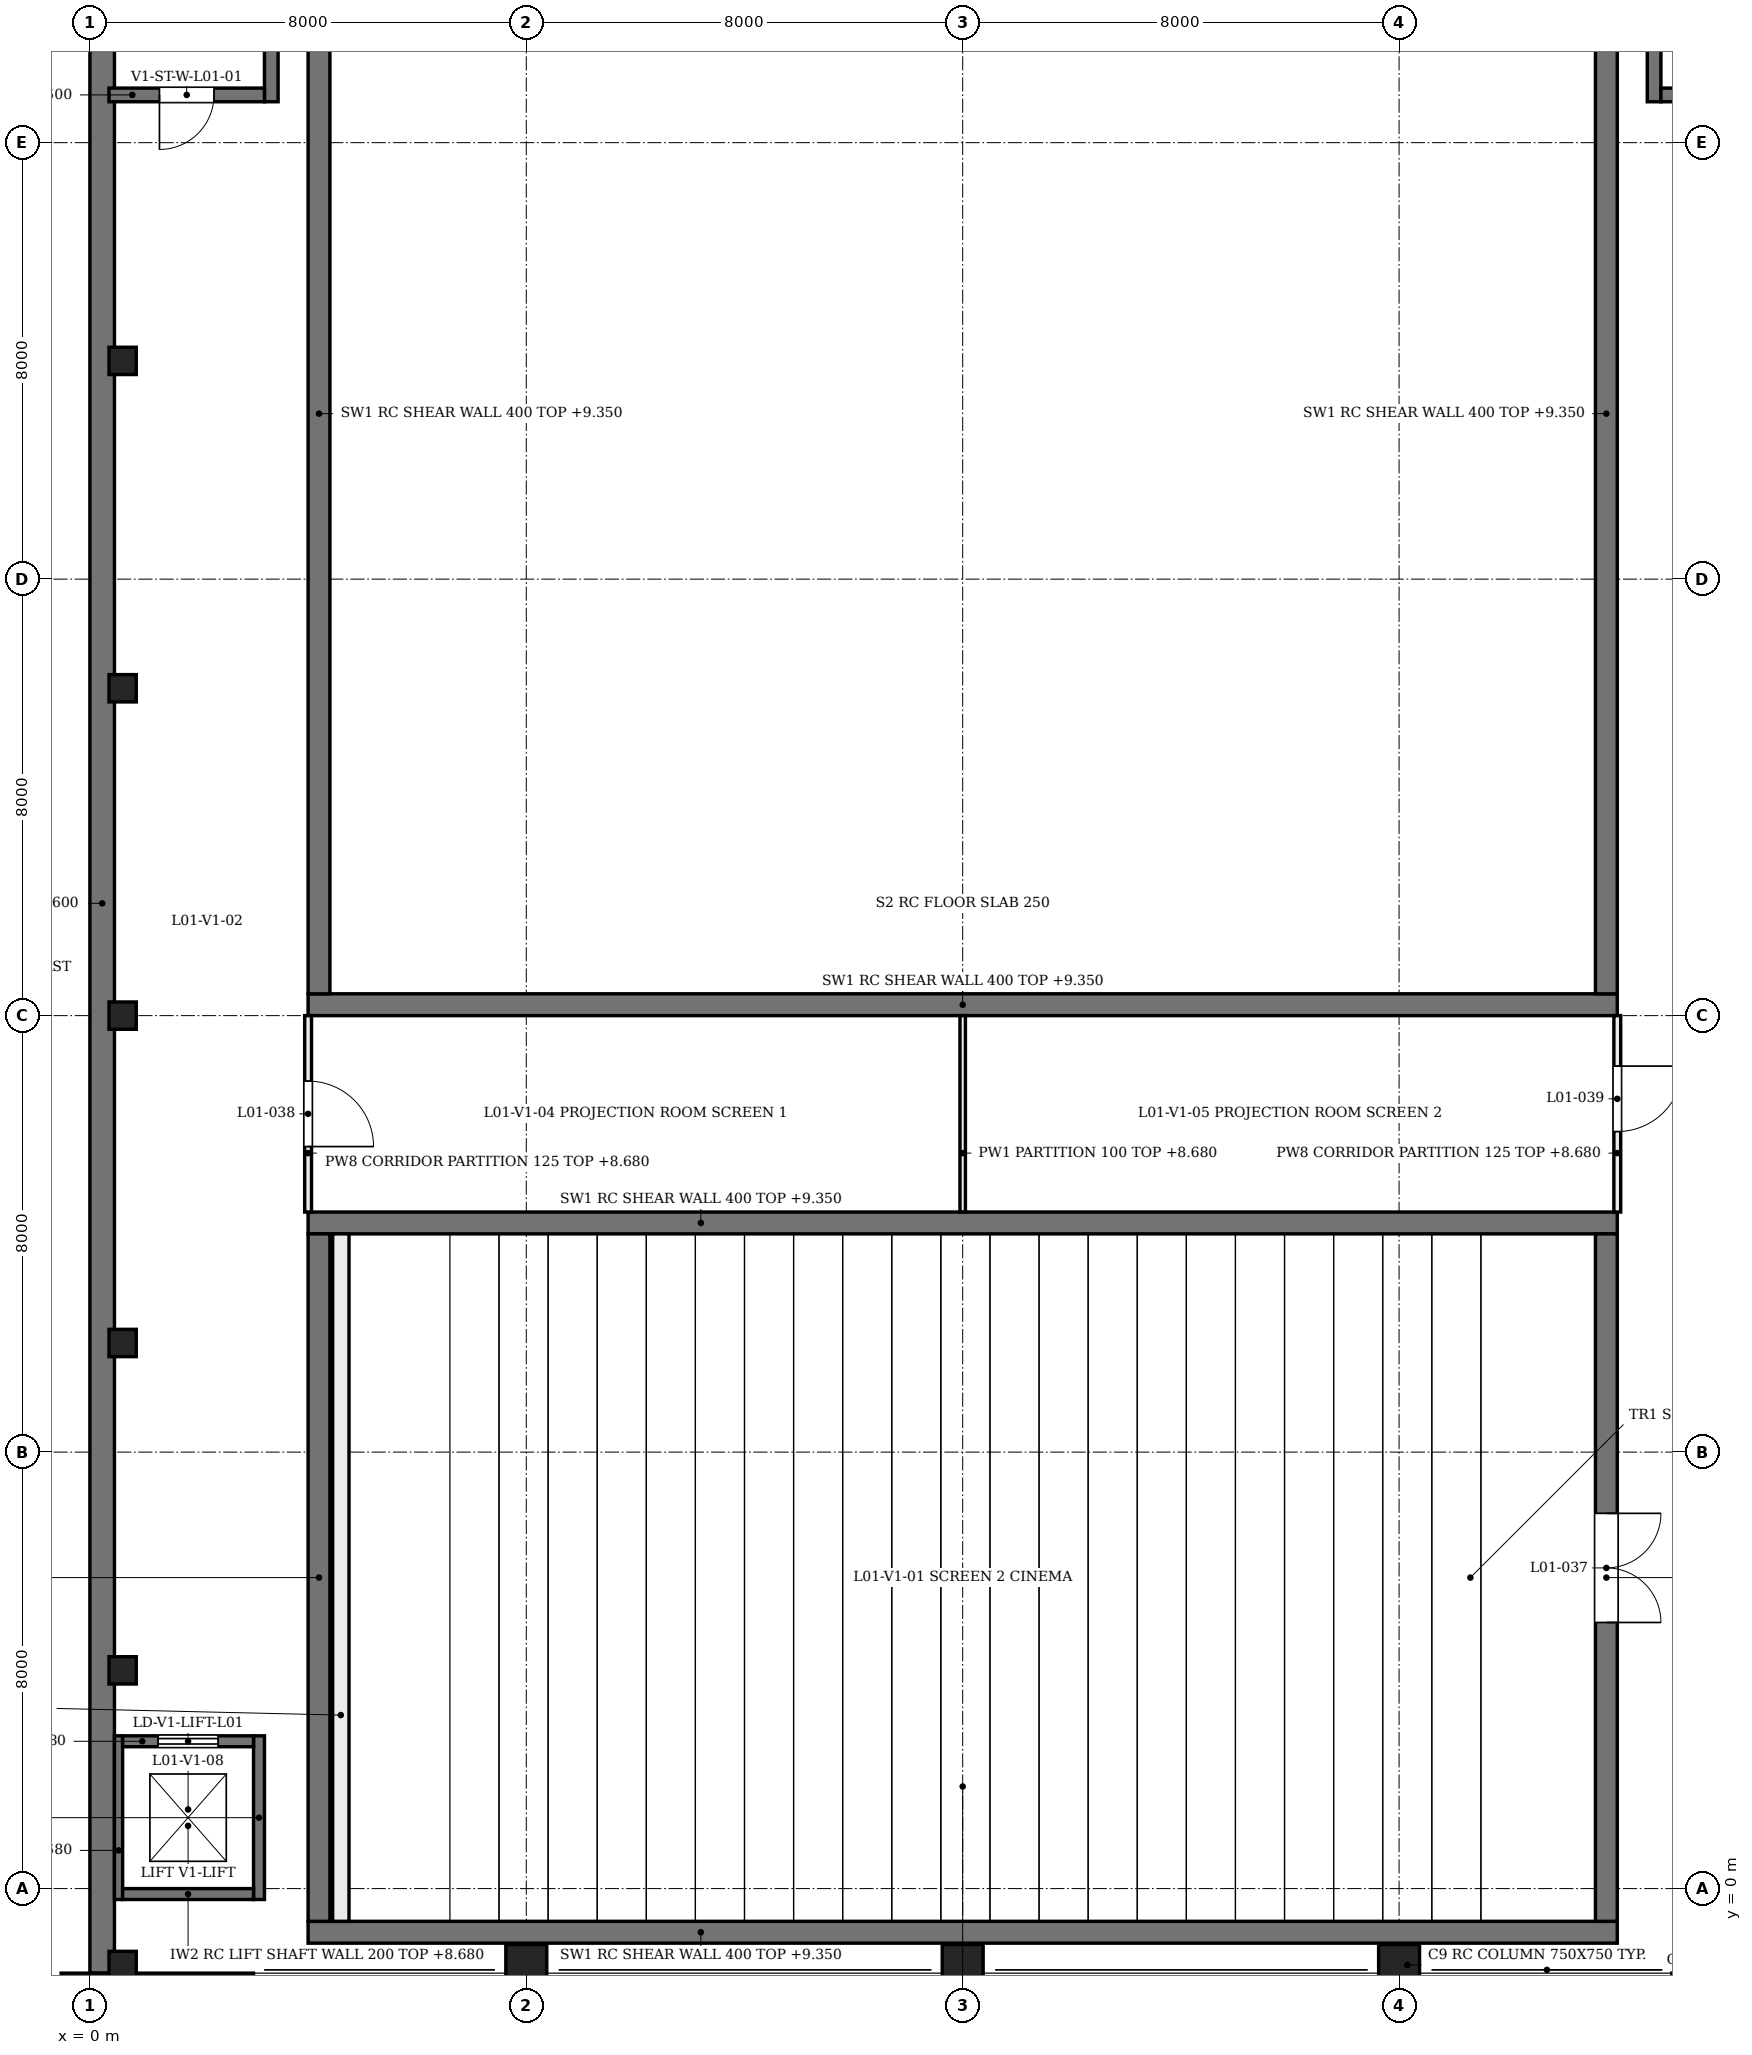
"""IFC4 building model, lengths in metres.
Left out: names, types, materials, properties, quantities, classifications, styles, units other than length and angle.
Written with IfcOpenShell. Run it as: python <this file> out.ifc"""

import sys

from ifc_helpers import new_model, si_unit, direction, frame, frame_2d, origin, origin_2d, place, context, subcontext, project, spatial, rectangle, hollow_rectangle, extrude, element, fill, save


model = new_model("IFC4")
c1 = context("Model", 3, precision=1e-05, world=origin(), true_north=direction((0.0, 1.0)))
c2 = subcontext(c1, "Body", "Model", "MODEL_VIEW")
j1 = project(units=[si_unit("LENGTHUNIT", "METRE"), si_unit("PLANEANGLEUNIT", "RADIAN")], contexts=[c1])
p1 = place(None, origin())
s1 = spatial("IfcSite", under=j1, at=p1, CompositionType="ELEMENT")
p2 = place(p1, origin())
s2 = spatial("IfcBuilding", under=s1, at=p2, CompositionType="ELEMENT")
p3 = place(p2, frame((0.0, 0.0, 4.8)))
s3 = spatial("IfcBuildingStorey", under=s2, at=p3, CompositionType="ELEMENT", Elevation=4.8)
p4 = place(p3, frame((4.0, 16.2, 0.0), z_axis=(0.0, 0.0, 1.0), x_axis=(1.0, 0.0, 0.0)))
e1 = element("IfcWall", 1, at=p4, inside=s3, PredefinedType="SHEAR", context=c2, shape_type="SweptSolid", body=[
    extrude(rectangle(XDim=24.0, YDim=0.4, at=frame_2d((12.0, 0.0))), origin(), (0.0, 0.0, 1.0), 4.55),
])
for number, where, z_axis, x_axis in (
    (2, (4.2, 16.4, 0.0), (0.0, 0.0, 1.0), (0.0, 1.0, 0.0)),
    (3, (27.8, 16.4, 0.0), (0.0, 0.0, 1.0), (0.0, 1.0, 0.0)),
):
    element("IfcWall", number, at=place(p3, frame(where, z_axis=z_axis, x_axis=x_axis)), inside=s3, PredefinedType="SHEAR", context=c2, shape_type="SweptSolid", body=[
        extrude(rectangle(XDim=22.6, YDim=0.4, at=frame_2d((11.3, 0.0))), origin(), (0.0, 0.0, 1.0), 4.55),
    ])
for number, where, z_axis, x_axis in (
    (4, (4.0, -0.8, 0.0), (0.0, 0.0, 1.0), (1.0, 0.0, 0.0)),
    (5, (4.0, 12.2, 0.0), (0.0, 0.0, 1.0), (1.0, 0.0, 0.0)),
):
    element("IfcWall", number, at=place(p3, frame(where, z_axis=z_axis, x_axis=x_axis)), inside=s3, PredefinedType="SHEAR", context=c2, shape_type="SweptSolid", body=[
        extrude(rectangle(XDim=24.0, YDim=0.4, at=frame_2d((12.0, 0.0))), origin(), (0.0, 0.0, 1.0), 4.55),
    ])
p5 = place(p3, frame((4.2, -0.6, 0.0), z_axis=(0.0, 0.0, 1.0), x_axis=(0.0, 1.0, 0.0)))
e6 = element("IfcWall", 6, at=p5, inside=s3, PredefinedType="SHEAR", context=c2, shape_type="SweptSolid", body=[
    extrude(rectangle(XDim=12.6, YDim=0.4, at=frame_2d((6.3, 0.0))), origin(), (0.0, 0.0, 1.0), 4.55),
])
p6 = place(p3, frame((27.8, -0.6, 0.0), z_axis=(0.0, 0.0, 1.0), x_axis=(0.0, 1.0, 0.0)))
e7 = element("IfcWall", 7, at=p6, inside=s3, PredefinedType="SHEAR", context=c2, shape_type="SweptSolid", body=[
    extrude(rectangle(XDim=12.6, YDim=0.4, at=frame_2d((6.3, 0.0))), origin(), (0.0, 0.0, 1.0), 4.55),
])
p7 = place(p6, frame((5.478, 0.0, 0.0)))
e8 = element("IfcOpeningElement", 8, at=p7, cuts=e7, PredefinedType="OPENING", context=c2, shape_type="SweptSolid", body=[
    extrude(rectangle(XDim=2.0, YDim=2.1, at=frame_2d((1.0, 1.05))), frame((0.0, 0.21, 0.0), z_axis=(0.0, -1.0, 0.0), x_axis=(1.0, 0.0, 0.0)), (0.0, 0.0, 1.0), 0.42),
])
for number, where, z_axis, x_axis in (
    (9, (0.6, -1.4, 0.0), (0.0, 0.0, 1.0), (1.0, 0.0, 0.0)),
    (10, (0.6, 4.0, 0.0), (0.0, 0.0, 1.0), (1.0, 0.0, 0.0)),
    (11, (0.6, 10.0, 0.0), (0.0, 0.0, 1.0), (1.0, 0.0, 0.0)),
    (12, (0.6, 16.0, 0.0), (0.0, 0.0, 1.0), (1.0, 0.0, 0.0)),
    (13, (0.6, 22.0, 0.0), (0.0, 0.0, 1.0), (1.0, 0.0, 0.0)),
    (14, (0.6, 28.0, 0.0), (0.0, 0.0, 1.0), (1.0, 0.0, 0.0)),
):
    element("IfcColumn", number, at=place(p3, frame(where, z_axis=z_axis, x_axis=x_axis)), inside=s3, PredefinedType="COLUMN", context=c2, shape_type="SweptSolid", body=[
        extrude(rectangle(XDim=0.5, YDim=0.5, at=origin_2d()), origin(), (0.0, 0.0, 1.0), 4.8),
    ])
for number, where, z_axis, x_axis in (
    (15, (8.0, -1.4, 0.0), (0.0, 0.0, 1.0), (1.0, 0.0, 0.0)),
    (16, (16.0, -1.4, 0.0), (0.0, 0.0, 1.0), (1.0, 0.0, 0.0)),
    (17, (24.0, -1.4, 0.0), (0.0, 0.0, 1.0), (1.0, 0.0, 0.0)),
):
    element("IfcColumn", number, at=place(p3, frame(where, z_axis=z_axis, x_axis=x_axis)), inside=s3, PredefinedType="COLUMN", context=c2, shape_type="SweptSolid", body=[
        extrude(rectangle(XDim=0.75, YDim=0.75, at=origin_2d()), origin(), (0.0, 0.0, 1.0), 4.8),
    ])
for number, where, z_axis, x_axis in (
    (18, (-1.213, 4.0, 0.0), (0.101, 0.0, 0.995), (0.0, 1.0, 0.0)),
    (19, (-1.213, 10.0, 0.0), (0.101, 0.0, 0.995), (0.0, 1.0, 0.0)),
    (20, (-1.213, 16.0, 0.0), (0.101, 0.0, 0.995), (0.0, 1.0, 0.0)),
    (21, (-1.213, 22.0, 0.0), (0.101, 0.0, 0.995), (0.0, 1.0, 0.0)),
    (22, (-1.213, 28.0, 0.0), (0.101, 0.0, 0.995), (0.0, 1.0, 0.0)),
):
    element("IfcColumn", number, at=place(p3, frame(where, z_axis=z_axis, x_axis=x_axis)), inside=s3, PredefinedType="COLUMN", context=c2, shape_type="SweptSolid", body=[
        extrude(hollow_rectangle(XDim=0.4, YDim=0.4, WallThickness=0.012, InnerFilletRadius=0.012, OuterFilletRadius=0.019, at=origin_2d()), origin(), (0.0, 0.0, 1.0), 4.825),
    ])
p8 = place(p3, frame((0.225, -1.55, 0.0), z_axis=(0.0, 0.0, 1.0), x_axis=(0.0, 1.0, 0.0)))
e23 = element("IfcWall", 23, at=p8, inside=s3, PredefinedType="SOLIDWALL", context=c2, shape_type="SweptSolid", body=[
    extrude(rectangle(XDim=41.1, YDim=0.45, at=frame_2d((20.55, 0.0))), origin(), (0.0, 0.0, 1.0), 4.8),
])
p9 = place(p3, frame((-0.527, -1.775, 0.0), z_axis=(0.0, 0.0, 1.0), x_axis=(1.0, 0.0, 0.0)))
e24 = element("IfcWall", 24, at=p9, inside=s3, PredefinedType="SOLIDWALL", context=c2, shape_type="SweptSolid", body=[
    extrude(rectangle(XDim=3.527, YDim=0.45, at=frame_2d((1.764, 0.0))), origin(), (0.0, 0.0, 1.0), 4.8),
])
p10 = place(p3, frame((3.325, 32.75, 0.0), z_axis=(0.0, 0.0, 1.0), x_axis=(0.0, 1.0, 0.0)))
e25 = element("IfcWall", 25, at=p10, inside=s3, PredefinedType="SOLIDWALL", context=c2, shape_type="SweptSolid", body=[
    extrude(rectangle(XDim=6.8, YDim=0.25, at=frame_2d((3.4, 0.0))), origin(), (0.0, 0.0, 1.0), 4.8),
])
p11 = place(p3, frame((0.35, 32.875, 0.0), z_axis=(0.0, 0.0, 1.0), x_axis=(1.0, 0.0, 0.0)))
e26 = element("IfcWall", 26, at=p11, inside=s3, PredefinedType="SOLIDWALL", context=c2, shape_type="SweptSolid", body=[
    extrude(rectangle(XDim=2.85, YDim=0.25, at=frame_2d((1.425, 0.0))), origin(), (0.0, 0.0, 1.0), 4.8),
])
p12 = place(p11, frame((0.925, 0.0, 0.0)))
e27 = element("IfcOpeningElement", 27, at=p12, cuts=e26, PredefinedType="OPENING", context=c2, shape_type="SweptSolid", body=[
    extrude(rectangle(XDim=1.0, YDim=2.1, at=frame_2d((0.5, 1.05))), frame((0.0, 0.135, 0.0), z_axis=(0.0, -1.0, 0.0), x_axis=(1.0, 0.0, 0.0)), (0.0, 0.0, 1.0), 0.27),
])
p13 = place(p3, frame((28.675, 32.75, 0.0), z_axis=(0.0, 0.0, 1.0), x_axis=(0.0, 1.0, 0.0)))
e28 = element("IfcWall", 28, at=p13, inside=s3, PredefinedType="SOLIDWALL", context=c2, shape_type="SweptSolid", body=[
    extrude(rectangle(XDim=6.8, YDim=0.25, at=frame_2d((3.4, 0.0))), origin(), (0.0, 0.0, 1.0), 4.8),
])
p14 = place(p3, frame((28.8, 32.875, 0.0), z_axis=(0.0, 0.0, 1.0), x_axis=(1.0, 0.0, 0.0)))
e29 = element("IfcWall", 29, at=p14, inside=s3, PredefinedType="SOLIDWALL", context=c2, shape_type="SweptSolid", body=[
    extrude(rectangle(XDim=2.85, YDim=0.25, at=frame_2d((1.425, 0.0))), origin(), (0.0, 0.0, 1.0), 4.8),
])
p15 = place(p14, frame((0.925, 0.0, 0.0)))
e30 = element("IfcOpeningElement", 30, at=p15, cuts=e29, PredefinedType="OPENING", context=c2, shape_type="SweptSolid", body=[
    extrude(rectangle(XDim=1.0, YDim=2.1, at=frame_2d((0.5, 1.05))), frame((0.0, 0.135, 0.0), z_axis=(0.0, -1.0, 0.0), x_axis=(1.0, 0.0, 0.0)), (0.0, 0.0, 1.0), 0.27),
])
p16 = place(p3, frame((0.525, -0.2, 0.0), z_axis=(0.0, 0.0, 1.0), x_axis=(0.0, 1.0, 0.0)))
e31 = element("IfcWall", 31, at=p16, inside=s3, PredefinedType="SOLIDWALL", context=c2, shape_type="SweptSolid", body=[
    extrude(rectangle(XDim=3.0, YDim=0.15, at=frame_2d((1.5, 0.0))), origin(), (0.0, 0.0, 1.0), 3.88),
])
p17 = place(p3, frame((3.1, -0.2, 0.0), z_axis=(0.0, 0.0, 1.0), x_axis=(0.0, 1.0, 0.0)))
e32 = element("IfcWall", 32, at=p17, inside=s3, PredefinedType="SOLIDWALL", context=c2, shape_type="SweptSolid", body=[
    extrude(rectangle(XDim=3.0, YDim=0.2, at=frame_2d((1.5, 0.0))), origin(), (0.0, 0.0, 1.0), 4.55),
])
p18 = place(p3, frame((0.6, -0.1, 0.0), z_axis=(0.0, 0.0, 1.0), x_axis=(1.0, 0.0, 0.0)))
e33 = element("IfcWall", 33, at=p18, inside=s3, PredefinedType="SOLIDWALL", context=c2, shape_type="SweptSolid", body=[
    extrude(rectangle(XDim=2.4, YDim=0.2, at=frame_2d((1.2, 0.0))), origin(), (0.0, 0.0, 1.0), 3.88),
])
p19 = place(p3, frame((0.6, 2.7, 0.0), z_axis=(0.0, 0.0, 1.0), x_axis=(1.0, 0.0, 0.0)))
e34 = element("IfcWall", 34, at=p19, inside=s3, PredefinedType="SOLIDWALL", context=c2, shape_type="SweptSolid", body=[
    extrude(rectangle(XDim=2.4, YDim=0.2, at=frame_2d((1.2, 0.0))), origin(), (0.0, 0.0, 1.0), 3.88),
])
p20 = place(p19, frame((0.65, 0.0, 0.0)))
e35 = element("IfcOpeningElement", 35, at=p20, cuts=e34, PredefinedType="OPENING", context=c2, shape_type="SweptSolid", body=[
    extrude(rectangle(XDim=1.1, YDim=2.1, at=frame_2d((0.55, 1.05))), frame((0.0, 0.11, 0.0), z_axis=(0.0, -1.0, 0.0), x_axis=(1.0, 0.0, 0.0)), (0.0, 0.0, 1.0), 0.22),
])
p21 = place(p3, frame((4.0, 12.4, 0.0), z_axis=(0.0, 0.0, 1.0), x_axis=(0.0, 1.0, 0.0)))
e36 = element("IfcWall", 36, at=p21, inside=s3, PredefinedType="PARTITIONING", context=c2, shape_type="SweptSolid", body=[
    extrude(rectangle(XDim=3.6, YDim=0.125, at=frame_2d((1.8, 0.0))), origin(), (0.0, 0.0, 1.0), 3.88),
])
p22 = place(p21, frame((1.2, 0.0, 0.0)))
e37 = element("IfcOpeningElement", 37, at=p22, cuts=e36, PredefinedType="OPENING", context=c2, shape_type="SweptSolid", body=[
    extrude(rectangle(XDim=1.2, YDim=2.2, at=frame_2d((0.6, 1.1))), frame((0.0, 0.073, 0.0), z_axis=(0.0, -1.0, 0.0), x_axis=(1.0, 0.0, 0.0)), (0.0, 0.0, 1.0), 0.145),
])
p23 = place(p3, frame((28.0, 12.4, 0.0), z_axis=(0.0, 0.0, 1.0), x_axis=(0.0, 1.0, 0.0)))
e38 = element("IfcWall", 38, at=p23, inside=s3, PredefinedType="PARTITIONING", context=c2, shape_type="SweptSolid", body=[
    extrude(rectangle(XDim=3.6, YDim=0.125, at=frame_2d((1.8, 0.0))), origin(), (0.0, 0.0, 1.0), 3.88),
])
p24 = place(p23, frame((1.475, 0.0, 0.0)))
e39 = element("IfcOpeningElement", 39, at=p24, cuts=e38, PredefinedType="OPENING", context=c2, shape_type="SweptSolid", body=[
    extrude(rectangle(XDim=1.2, YDim=2.2, at=frame_2d((0.6, 1.1))), frame((0.0, 0.073, 0.0), z_axis=(0.0, -1.0, 0.0), x_axis=(1.0, 0.0, 0.0)), (0.0, 0.0, 1.0), 0.145),
])
p25 = place(p3, frame((16.0, 12.4, 0.0), z_axis=(0.0, 0.0, 1.0), x_axis=(0.0, 1.0, 0.0)))
e40 = element("IfcWall", 40, at=p25, inside=s3, PredefinedType="PARTITIONING", context=c2, shape_type="SweptSolid", body=[
    extrude(rectangle(XDim=3.6, YDim=0.1, at=frame_2d((1.8, 0.0))), origin(), (0.0, 0.0, 1.0), 3.88),
])
p26 = place(p2, origin())
s4 = spatial("IfcBuildingStorey", under=s2, at=p26, CompositionType="ELEMENT", Elevation=0.0)
p27 = place(p26, frame((4.6, 16.4, 0.0), z_axis=(0.0, 0.0, 1.0), x_axis=(0.0, 1.0, 0.0)))
e41 = element("IfcWall", 41, at=p27, inside=s4, PredefinedType="PARTITIONING", context=c2, shape_type="SweptSolid", body=[
    extrude(rectangle(XDim=22.6, YDim=0.3, at=frame_2d((11.3, 0.0))), origin(), (0.0, 0.0, 1.0), 6.95),
])
p28 = place(p3, frame((4.6, -0.6, 0.0), z_axis=(0.0, 0.0, 1.0), x_axis=(0.0, 1.0, 0.0)))
e42 = element("IfcWall", 42, at=p28, inside=s3, PredefinedType="PARTITIONING", context=c2, shape_type="SweptSolid", body=[
    extrude(rectangle(XDim=12.6, YDim=0.3, at=frame_2d((6.3, 0.0))), origin(), (0.0, 0.0, 1.0), 6.95),
])
p29 = place(p12, frame((1.0, 0.0, 0.0), z_axis=(0.0, 0.0, 1.0), x_axis=(-1.0, 0.0, 0.0)))
e43 = element("IfcDoor", 43, at=p29, inside=s3, OperationType="SINGLE_SWING_LEFT", PredefinedType="DOOR", context=c2, shape_type="SweptSolid", body=[
    extrude(rectangle(XDim=1.0, YDim=2.1, at=frame_2d((0.5, 1.05))), frame((0.0, 0.025, 0.0), z_axis=(0.0, -1.0, 0.0), x_axis=(1.0, 0.0, 0.0)), (0.0, 0.0, 1.0), 0.05),
])
fill(e27, e43)
p30 = place(p20, origin())
e44 = element("IfcDoor", 44, at=p30, inside=s3, OperationType="DOUBLE_DOOR_SLIDING", PredefinedType="DOOR", context=c2, shape_type="SweptSolid", body=[
    extrude(rectangle(XDim=1.1, YDim=2.1, at=frame_2d((0.55, 1.05))), frame((0.0, 0.025, 0.0), z_axis=(0.0, -1.0, 0.0), x_axis=(1.0, 0.0, 0.0)), (0.0, 0.0, 1.0), 0.05),
])
fill(e35, e44)
p31 = place(p7, frame((2.0, 0.0, 0.0), z_axis=(0.0, 0.0, 1.0), x_axis=(-1.0, 0.0, 0.0)))
e45 = element("IfcDoor", 45, at=p31, inside=s3, OperationType="DOUBLE_DOOR_SINGLE_SWING", PredefinedType="DOOR", context=c2, shape_type="SweptSolid", body=[
    extrude(rectangle(XDim=2.0, YDim=2.1, at=frame_2d((1.0, 1.05))), frame((0.0, 0.025, 0.0), z_axis=(0.0, -1.0, 0.0), x_axis=(1.0, 0.0, 0.0)), (0.0, 0.0, 1.0), 0.05),
])
fill(e8, e45)
p32 = place(p22, frame((1.2, 0.0, 0.0), z_axis=(0.0, 0.0, 1.0), x_axis=(-1.0, 0.0, 0.0)))
e46 = element("IfcDoor", 46, at=p32, inside=s3, OperationType="SINGLE_SWING_LEFT", PredefinedType="DOOR", context=c2, shape_type="SweptSolid", body=[
    extrude(rectangle(XDim=1.2, YDim=2.2, at=frame_2d((0.6, 1.1))), frame((0.0, 0.025, 0.0), z_axis=(0.0, -1.0, 0.0), x_axis=(1.0, 0.0, 0.0)), (0.0, 0.0, 1.0), 0.05),
])
fill(e37, e46)
p33 = place(p24, origin())
e47 = element("IfcDoor", 47, at=p33, inside=s3, OperationType="SINGLE_SWING_RIGHT", PredefinedType="DOOR", context=c2, shape_type="SweptSolid", body=[
    extrude(rectangle(XDim=1.2, YDim=2.2, at=frame_2d((0.6, 1.1))), frame((0.0, 0.025, 0.0), z_axis=(0.0, -1.0, 0.0), x_axis=(1.0, 0.0, 0.0)), (0.0, 0.0, 1.0), 0.05),
])
fill(e39, e47)
save(model, sys.argv[1])
